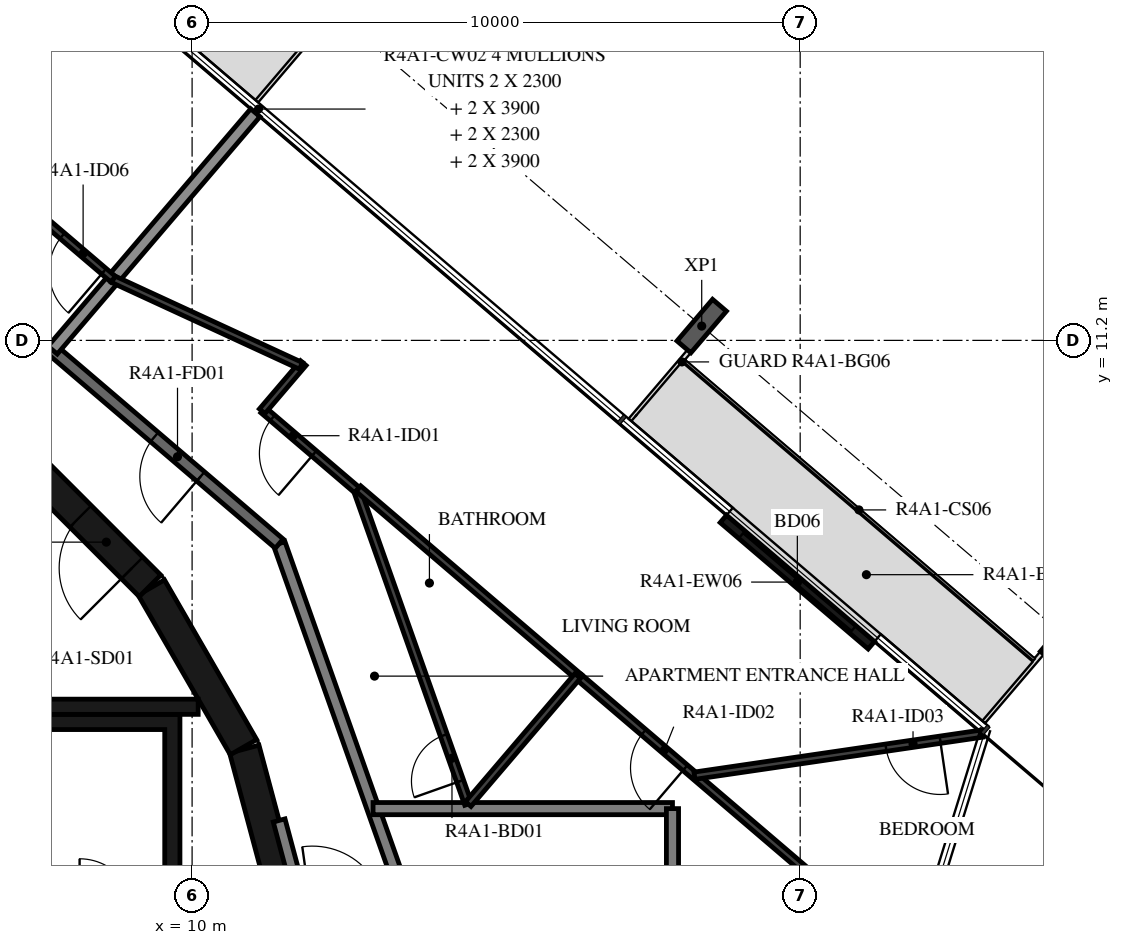
"""IFC4 building model, lengths in metres.
Left out: names, types, materials, properties, quantities, classifications, styles, units other than length and angle.
Written with IfcOpenShell. Run it as: python <this file> out.ifc"""

import sys

from ifc_helpers import new_model, si_unit, direction, frame, frame_2d, origin, origin_2d, place, context, subcontext, project, spatial, polyline, rectangle, i_section, outline, extrude, element, fill, save


model = new_model("IFC4")
c1 = context("Model", 3, precision=1e-05, world=origin(), true_north=direction((0.0, 1.0)))
c2 = subcontext(c1, "Body", "Model", "MODEL_VIEW")
j1 = project(units=[si_unit("LENGTHUNIT", "METRE"), si_unit("PLANEANGLEUNIT", "RADIAN")], contexts=[c1])
p1 = place(None, origin())
s1 = spatial("IfcSite", under=j1, at=p1, CompositionType="ELEMENT")
p2 = place(p1, origin())
s2 = spatial("IfcBuilding", under=s1, at=p2, CompositionType="ELEMENT")
p3 = place(p2, frame((0.0, 0.0, 155.2)))
s3 = spatial("IfcBuildingStorey", under=s2, at=p3, CompositionType="ELEMENT", Elevation=155.2)
for number, where, z_axis, x_axis in (
    (1, (24.358, 6.331, -0.38), (0.0, 0.0, 1.0), (0.76, -0.649, 0.0)),
    (2, (18.381, 11.436, -0.38), (0.0, 0.0, 1.0), (0.76, -0.649, 0.0)),
):
    element("IfcColumn", number, at=place(p3, frame(where, z_axis=z_axis, x_axis=x_axis)), inside=s3, PredefinedType="COLUMN", context=c2, shape_type="SweptSolid", body=[
        extrude(i_section(OverallWidth=0.3, OverallDepth=0.9, WebThickness=0.019, FlangeThickness=0.035, FilletRadius=0.03, at=origin_2d()), origin(), (0.0, 0.0, 1.0), 3.5),
    ])
p4 = place(p3, frame((21.17, 6.186, 0.0), z_axis=(0.0, 0.0, 1.0), x_axis=(-0.760359548534, 0.649502391799, 0.0)))
e3 = element("IfcWall", 3, at=p4, inside=s3, PredefinedType="STANDARD", context=c2, shape_type="SweptSolid", body=[
    extrude(rectangle(XDim=3.2, YDim=0.16, at=frame_2d((1.6, 0.0))), origin(), (0.0, 0.0, 1.0), 3.12),
])
p5 = place(p4, frame((0.4, 0.0, 0.0)))
e4 = element("IfcOpeningElement", 4, at=p5, cuts=e3, PredefinedType="OPENING", context=c2, shape_type="SweptSolid", body=[
    extrude(rectangle(XDim=2.4, YDim=2.4, at=frame_2d((1.2, 1.2))), frame((0.0, 0.09, 0.0), z_axis=(0.0, -1.0, 0.0), x_axis=(1.0, 0.0, 0.0)), (0.0, 0.0, 1.0), 0.18),
])
for number, where, z_axis, x_axis in (
    (5, (11.643, 1.55, 0.0), (0.0, 0.0, 1.0), (-0.259, 0.966, 0.0)),
    (6, (10.845, 4.51, 0.0), (0.0, 0.0, 1.0), (-0.5, 0.866, 0.0)),
):
    element("IfcWall", number, at=place(p3, frame(where, z_axis=z_axis, x_axis=x_axis)), inside=s3, PredefinedType="SHEAR", context=c2, shape_type="SweptSolid", body=[
        extrude(rectangle(XDim=3.033, YDim=0.5, at=frame_2d((1.516, 0.0))), origin(), (0.0, 0.0, 1.0), 3.12),
    ])
p6 = place(p3, frame((9.308, 7.164, 0.0), z_axis=(0.0, 0.0, 1.0), x_axis=(-0.707106781187, 0.707106781187, 0.0)))
e7 = element("IfcWall", 7, at=p6, inside=s3, PredefinedType="SHEAR", context=c2, shape_type="SweptSolid", body=[
    extrude(rectangle(XDim=3.032, YDim=0.5, at=frame_2d((1.516, 0.0))), origin(), (0.0, 0.0, 1.0), 3.12),
])
p7 = place(p6, frame((0.416, 0.0, 0.0)))
e8 = element("IfcOpeningElement", 8, at=p7, cuts=e7, PredefinedType="OPENING", context=c2, shape_type="SweptSolid", body=[
    extrude(rectangle(XDim=1.2, YDim=2.1, at=frame_2d((0.6, 1.05))), frame((0.0, 0.26, 0.0), z_axis=(0.0, -1.0, 0.0), x_axis=(1.0, 0.0, 0.0)), (0.0, 0.0, 1.0), 0.52),
])
p8 = place(p3, frame((7.0, 5.175, 0.0), z_axis=(0.0, 0.0, 1.0), x_axis=(1.0, 0.0, 0.0)))
e9 = element("IfcWall", 9, at=p8, inside=s3, PredefinedType="SHEAR", context=c2, shape_type="SweptSolid", body=[
    extrude(rectangle(XDim=3.1, YDim=0.25, at=frame_2d((1.55, 0.0))), origin(), (0.0, 0.0, 1.0), 3.12),
])
p9 = place(p3, origin())
e10 = element("IfcWall", 10, at=p9, inside=s3, PredefinedType="SHEAR", context=c2, shape_type="SweptSolid", body=[
    extrude(outline(polyline([(-9.55, 4.8), (-1.2, 4.8), (-1.2, 1.9), (-0.95, 1.9), (-0.95, 4.8), (0.95, 4.8), (0.95, 1.9), (1.2, 1.9), (1.2, 4.8), (3.1, 4.8), (3.1, 1.9), (3.35, 1.9), (3.35, 4.8), (5.25, 4.8), (5.25, 1.9), (5.5, 1.9), (5.5, 4.8), (7.4, 4.8), (7.4, 1.9), (7.65, 1.9), (7.65, 4.8), (9.55, 4.8), (9.55, 1.9), (9.8, 1.9), (9.8, 4.8), (9.8, 5.05), (-9.8, 5.05), (-9.8, 4.8), (-9.8, 1.9), (-9.55, 1.9), (-9.55, 4.8)])), origin(), (0.0, 0.0, 1.0), 3.12),
])
p10 = place(p3, frame((11.87, 1.668, 0.0), z_axis=(0.0, 0.0, 1.0), x_axis=(-0.258836880648, 0.965921047093, 0.0)))
e11 = element("IfcWall", 11, at=p10, inside=s3, PredefinedType="STANDARD", context=c2, shape_type="SweptSolid", body=[
    extrude(rectangle(XDim=1.695, YDim=0.2, at=frame_2d((0.848, 0.0))), origin(), (0.0, 0.0, 1.0), 3.12),
])
p11 = place(p3, frame((13.542, 1.903, 0.0), z_axis=(0.0, 0.0, 1.0), x_axis=(-0.333808508206, 0.942640907159, 0.0)))
e12 = element("IfcWall", 12, at=p11, inside=s3, PredefinedType="STANDARD", context=c2, shape_type="SweptSolid", body=[
    extrude(rectangle(XDim=6.317, YDim=0.2, at=frame_2d((3.158, 0.0))), origin(), (0.0, 0.0, 1.0), 3.12),
])
p12 = place(p3, frame((11.433, 7.858, 0.0), z_axis=(0.0, 0.0, 1.0), x_axis=(-0.760412154545, 0.649440801937, 0.0)))
e13 = element("IfcWall", 13, at=p12, inside=s3, PredefinedType="STANDARD", context=c2, shape_type="SweptSolid", body=[
    extrude(rectangle(XDim=7.181, YDim=0.2, at=frame_2d((3.59, 0.0))), origin(), (0.0, 0.0, 1.0), 3.12),
])
p13 = place(p12, frame((1.7, 0.0, 0.0)))
e14 = element("IfcOpeningElement", 14, at=p13, cuts=e13, PredefinedType="OPENING", context=c2, shape_type="SweptSolid", body=[
    extrude(rectangle(XDim=1.0, YDim=2.1, at=frame_2d((0.5, 1.05))), frame((0.0, 0.11, 0.0), z_axis=(0.0, -1.0, 0.0), x_axis=(1.0, 0.0, 0.0)), (0.0, 0.0, 1.0), 0.22),
])
p14 = place(p12, frame((5.101, 0.0, 0.0)))
e15 = element("IfcOpeningElement", 15, at=p14, cuts=e13, PredefinedType="OPENING", context=c2, shape_type="SweptSolid", body=[
    extrude(rectangle(XDim=1.0, YDim=2.1, at=frame_2d((0.5, 1.05))), frame((0.0, 0.11, 0.0), z_axis=(0.0, -1.0, 0.0), x_axis=(1.0, 0.0, 0.0)), (0.0, 0.0, 1.0), 0.22),
])
p15 = place(p3, frame((17.9, 3.5, 0.0), z_axis=(0.0, 0.0, 1.0), x_axis=(-1.0, 0.0, 0.0)))
e16 = element("IfcWall", 16, at=p15, inside=s3, PredefinedType="STANDARD", context=c2, shape_type="SweptSolid", body=[
    extrude(rectangle(XDim=4.924, YDim=0.2, at=frame_2d((2.462, 0.0))), origin(), (0.0, 0.0, 1.0), 3.12),
])
p16 = place(p3, frame((17.9, -3.318, 0.0), z_axis=(0.0, 0.0, 1.0), x_axis=(0.0, 1.0, 0.0)))
e17 = element("IfcWall", 17, at=p16, inside=s3, PredefinedType="STANDARD", context=c2, shape_type="SweptSolid", body=[
    extrude(rectangle(XDim=6.818, YDim=0.2, at=frame_2d((3.409, 0.0))), origin(), (0.0, 0.0, 1.0), 3.12),
])
p17 = place(p3, frame((11.04, 14.943, 0.0), z_axis=(0.0, 0.0, 1.0), x_axis=(-0.649442880087, -0.760410379666, 0.0)))
e18 = element("IfcWall", 18, at=p17, inside=s3, PredefinedType="STANDARD", context=c2, shape_type="SweptSolid", body=[
    extrude(rectangle(XDim=5.133, YDim=0.2, at=frame_2d((2.566, 0.0))), origin(), (0.0, 0.0, 1.0), 2.73),
])
p18 = place(p3, frame((14.541, 3.575, 0.0), z_axis=(0.0, 0.0, 1.0), x_axis=(-0.333799280318, 0.942644174893, 0.0)))
e19 = element("IfcWall", 19, at=p18, inside=s3, PredefinedType="PARTITIONING", context=c2, shape_type="SweptSolid", body=[
    extrude(rectangle(XDim=5.477, YDim=0.12, at=frame_2d((2.738, 0.0))), origin(), (0.0, 0.0, 1.0), 3.12),
])
p19 = place(p18, frame((0.4, 0.0, 0.0)))
e20 = element("IfcOpeningElement", 20, at=p19, cuts=e19, PredefinedType="OPENING", context=c2, shape_type="SweptSolid", body=[
    extrude(rectangle(XDim=0.8, YDim=2.1, at=frame_2d((0.4, 1.05))), frame((0.0, 0.07, 0.0), z_axis=(0.0, -1.0, 0.0), x_axis=(1.0, 0.0, 0.0)), (0.0, 0.0, 1.0), 0.14),
])
p20 = place(p3, frame((12.713, 8.737, 0.0), z_axis=(0.0, 0.0, 1.0), x_axis=(-0.760410825807, 0.649442357716, 0.0)))
e21 = element("IfcWall", 21, at=p20, inside=s3, PredefinedType="PARTITIONING", context=c2, shape_type="SweptSolid", body=[
    extrude(rectangle(XDim=2.029, YDim=0.12, at=frame_2d((1.014, 0.0))), origin(), (0.0, 0.0, 1.0), 3.12),
])
p21 = place(p20, frame((0.929, 0.0, 0.0)))
e22 = element("IfcOpeningElement", 22, at=p21, cuts=e21, PredefinedType="OPENING", context=c2, shape_type="SweptSolid", body=[
    extrude(rectangle(XDim=0.9, YDim=2.1, at=frame_2d((0.45, 1.05))), frame((0.0, 0.07, 0.0), z_axis=(0.0, -1.0, 0.0), x_axis=(1.0, 0.0, 0.0)), (0.0, 0.0, 1.0), 0.14),
])
p22 = place(p3, frame((12.734, 8.762, 0.0), z_axis=(0.0, 0.0, 1.0), x_axis=(0.760390484255, -0.649466174219, 0.0)))
e23 = element("IfcWall", 23, at=p22, inside=s3, PredefinedType="PARTITIONING", context=c2, shape_type="SweptSolid", body=[
    extrude(rectangle(XDim=4.783, YDim=0.12, at=frame_2d((2.391, 0.0))), origin(), (0.0, 0.0, 1.0), 3.12),
])
p23 = place(p3, frame((11.153, 10.034, 0.0), z_axis=(0.0, 0.0, 1.0), x_axis=(0.649381401329, 0.760462882466, 0.0)))
e24 = element("IfcWall", 24, at=p23, inside=s3, PredefinedType="PARTITIONING", context=c2, shape_type="SweptSolid", body=[
    extrude(rectangle(XDim=1.042, YDim=0.12, at=frame_2d((0.521, 0.0))), origin(), (0.0, 0.0, 1.0), 3.12),
])
p24 = place(p3, frame((11.79, 10.781, 0.0), z_axis=(0.0, 0.0, 1.0), x_axis=(-0.907999296286, 0.418971691101, 0.0)))
e25 = element("IfcWall", 25, at=p24, inside=s3, PredefinedType="PARTITIONING", context=c2, shape_type="SweptSolid", body=[
    extrude(rectangle(XDim=3.401, YDim=0.12, at=frame_2d((1.701, 0.0))), origin(), (0.0, 0.0, 1.0), 3.12),
])
p25 = place(p3, frame((23.411, -0.357, 0.0), z_axis=(0.0, 0.0, 1.0), x_axis=(-0.76041871148, 0.649433124525, 0.0)))
e26 = element("IfcWall", 26, at=p25, inside=s3, PredefinedType="PARTITIONING", context=c2, shape_type="SweptSolid", body=[
    extrude(rectangle(XDim=9.259, YDim=0.12, at=frame_2d((4.629, 0.0))), origin(), (0.0, 0.0, 1.0), 3.12),
])
p26 = place(p25, frame((6.972, 0.0, 0.0)))
e27 = element("IfcOpeningElement", 27, at=p26, cuts=e26, PredefinedType="OPENING", context=c2, shape_type="SweptSolid", body=[
    extrude(rectangle(XDim=0.9, YDim=2.1, at=frame_2d((0.45, 1.05))), frame((0.0, 0.07, 0.0), z_axis=(0.0, -1.0, 0.0), x_axis=(1.0, 0.0, 0.0)), (0.0, 0.0, 1.0), 0.14),
])
p27 = place(p25, frame((0.2, 0.0, 0.0)))
e28 = element("IfcOpeningElement", 28, at=p27, cuts=e26, PredefinedType="OPENING", context=c2, shape_type="SweptSolid", body=[
    extrude(rectangle(XDim=0.9, YDim=2.1, at=frame_2d((0.45, 1.05))), frame((0.0, 0.07, 0.0), z_axis=(0.0, -1.0, 0.0), x_axis=(1.0, 0.0, 0.0)), (0.0, 0.0, 1.0), 0.14),
])
p28 = place(p3, frame((16.341, 5.682, 0.0), z_axis=(0.0, 0.0, 1.0), x_axis=(-0.64946993237, -0.76038727432, 0.0)))
e29 = element("IfcWall", 29, at=p28, inside=s3, PredefinedType="PARTITIONING", context=c2, shape_type="SweptSolid", body=[
    extrude(rectangle(XDim=2.771, YDim=0.12, at=frame_2d((1.386, 0.0))), origin(), (0.0, 0.0, 1.0), 3.12),
])
p29 = place(p3, frame((22.994, 4.734, 0.0), z_axis=(0.0, 0.0, 1.0), x_axis=(-0.989449286977, -0.144879634529, 0.0)))
e30 = element("IfcWall", 30, at=p29, inside=s3, PredefinedType="PARTITIONING", context=c2, shape_type="SweptSolid", body=[
    extrude(rectangle(XDim=4.782, YDim=0.12, at=frame_2d((2.391, 0.0))), origin(), (0.0, 0.0, 1.0), 3.12),
])
p30 = place(p29, frame((0.7, 0.0, 0.0)))
e31 = element("IfcOpeningElement", 31, at=p30, cuts=e30, PredefinedType="OPENING", context=c2, shape_type="SweptSolid", body=[
    extrude(rectangle(XDim=0.9, YDim=2.1, at=frame_2d((0.45, 1.05))), frame((0.0, 0.07, 0.0), z_axis=(0.0, -1.0, 0.0), x_axis=(1.0, 0.0, 0.0)), (0.0, 0.0, 1.0), 0.14),
])
p31 = place(p3, frame((8.702, 12.206, 0.0), z_axis=(0.0, 0.0, 1.0), x_axis=(-0.760401313718, 0.649453494945, 0.0)))
e32 = element("IfcWall", 32, at=p31, inside=s3, PredefinedType="PARTITIONING", context=c2, shape_type="SweptSolid", body=[
    extrude(rectangle(XDim=16.724, YDim=0.12, at=frame_2d((8.362, 0.0))), origin(), (0.0, 0.0, 1.0), 3.12),
])
p32 = place(p31, frame((0.2, 0.0, 0.0)))
e33 = element("IfcOpeningElement", 33, at=p32, cuts=e32, PredefinedType="OPENING", context=c2, shape_type="SweptSolid", body=[
    extrude(rectangle(XDim=0.9, YDim=2.1, at=frame_2d((0.45, 1.05))), frame((0.0, 0.07, 0.0), z_axis=(0.0, -1.0, 0.0), x_axis=(1.0, 0.0, 0.0)), (0.0, 0.0, 1.0), 0.14),
])
p33 = place(p31, frame((7.099, 0.0, 0.0)))
e34 = element("IfcOpeningElement", 34, at=p33, cuts=e32, PredefinedType="OPENING", context=c2, shape_type="SweptSolid", body=[
    extrude(rectangle(XDim=0.9, YDim=2.1, at=frame_2d((0.45, 1.05))), frame((0.0, 0.07, 0.0), z_axis=(0.0, -1.0, 0.0), x_axis=(1.0, 0.0, 0.0)), (0.0, 0.0, 1.0), 0.14),
])
p34 = place(p5, origin())
e35 = element("IfcDoor", 35, at=p34, inside=s3, OperationType="DOUBLE_DOOR_SLIDING", PredefinedType="DOOR", context=c2, shape_type="SweptSolid", body=[
    extrude(rectangle(XDim=2.4, YDim=2.4, at=frame_2d((1.2, 1.2))), frame((0.0, 0.025, 0.0), z_axis=(0.0, -1.0, 0.0), x_axis=(1.0, 0.0, 0.0)), (0.0, 0.0, 1.0), 0.05),
])
fill(e4, e35)
p35 = place(p7, origin())
e36 = element("IfcDoor", 36, at=p35, inside=s3, OperationType="SINGLE_SWING_RIGHT", PredefinedType="DOOR", context=c2, shape_type="SweptSolid", body=[
    extrude(rectangle(XDim=1.2, YDim=2.1, at=frame_2d((0.6, 1.05))), frame((0.0, 0.025, 0.0), z_axis=(0.0, -1.0, 0.0), x_axis=(1.0, 0.0, 0.0)), (0.0, 0.0, 1.0), 0.05),
])
fill(e8, e36)
p36 = place(p13, origin())
e37 = element("IfcDoor", 37, at=p36, inside=s3, OperationType="SINGLE_SWING_LEFT", PredefinedType="DOOR", context=c2, shape_type="SweptSolid", body=[
    extrude(rectangle(XDim=1.0, YDim=2.1, at=frame_2d((0.5, 1.05))), frame((0.0, 0.025, 0.0), z_axis=(0.0, -1.0, 0.0), x_axis=(1.0, 0.0, 0.0)), (0.0, 0.0, 1.0), 0.05),
])
fill(e14, e37)
p37 = place(p19, origin())
e38 = element("IfcDoor", 38, at=p37, inside=s3, OperationType="SINGLE_SWING_LEFT", PredefinedType="DOOR", context=c2, shape_type="SweptSolid", body=[
    extrude(rectangle(XDim=0.8, YDim=2.1, at=frame_2d((0.4, 1.05))), frame((0.0, 0.025, 0.0), z_axis=(0.0, -1.0, 0.0), x_axis=(1.0, 0.0, 0.0)), (0.0, 0.0, 1.0), 0.05),
])
fill(e20, e38)
p38 = place(p21, origin())
e39 = element("IfcDoor", 39, at=p38, inside=s3, OperationType="SINGLE_SWING_LEFT", PredefinedType="DOOR", context=c2, shape_type="SweptSolid", body=[
    extrude(rectangle(XDim=0.9, YDim=2.1, at=frame_2d((0.45, 1.05))), frame((0.0, 0.025, 0.0), z_axis=(0.0, -1.0, 0.0), x_axis=(1.0, 0.0, 0.0)), (0.0, 0.0, 1.0), 0.05),
])
fill(e22, e39)
p39 = place(p26, origin())
e40 = element("IfcDoor", 40, at=p39, inside=s3, OperationType="SINGLE_SWING_RIGHT", PredefinedType="DOOR", context=c2, shape_type="SweptSolid", body=[
    extrude(rectangle(XDim=0.9, YDim=2.1, at=frame_2d((0.45, 1.05))), frame((0.0, 0.025, 0.0), z_axis=(0.0, -1.0, 0.0), x_axis=(1.0, 0.0, 0.0)), (0.0, 0.0, 1.0), 0.05),
])
fill(e27, e40)
p40 = place(p30, origin())
e41 = element("IfcDoor", 41, at=p40, inside=s3, OperationType="SINGLE_SWING_LEFT", PredefinedType="DOOR", context=c2, shape_type="SweptSolid", body=[
    extrude(rectangle(XDim=0.9, YDim=2.1, at=frame_2d((0.45, 1.05))), frame((0.0, 0.025, 0.0), z_axis=(0.0, -1.0, 0.0), x_axis=(1.0, 0.0, 0.0)), (0.0, 0.0, 1.0), 0.05),
])
fill(e31, e41)
p41 = place(p32, origin())
e42 = element("IfcDoor", 42, at=p41, inside=s3, OperationType="SINGLE_SWING_RIGHT", PredefinedType="DOOR", context=c2, shape_type="SweptSolid", body=[
    extrude(rectangle(XDim=0.9, YDim=2.1, at=frame_2d((0.45, 1.05))), frame((0.0, 0.025, 0.0), z_axis=(0.0, -1.0, 0.0), x_axis=(1.0, 0.0, 0.0)), (0.0, 0.0, 1.0), 0.05),
])
fill(e33, e42)
save(model, sys.argv[1])
